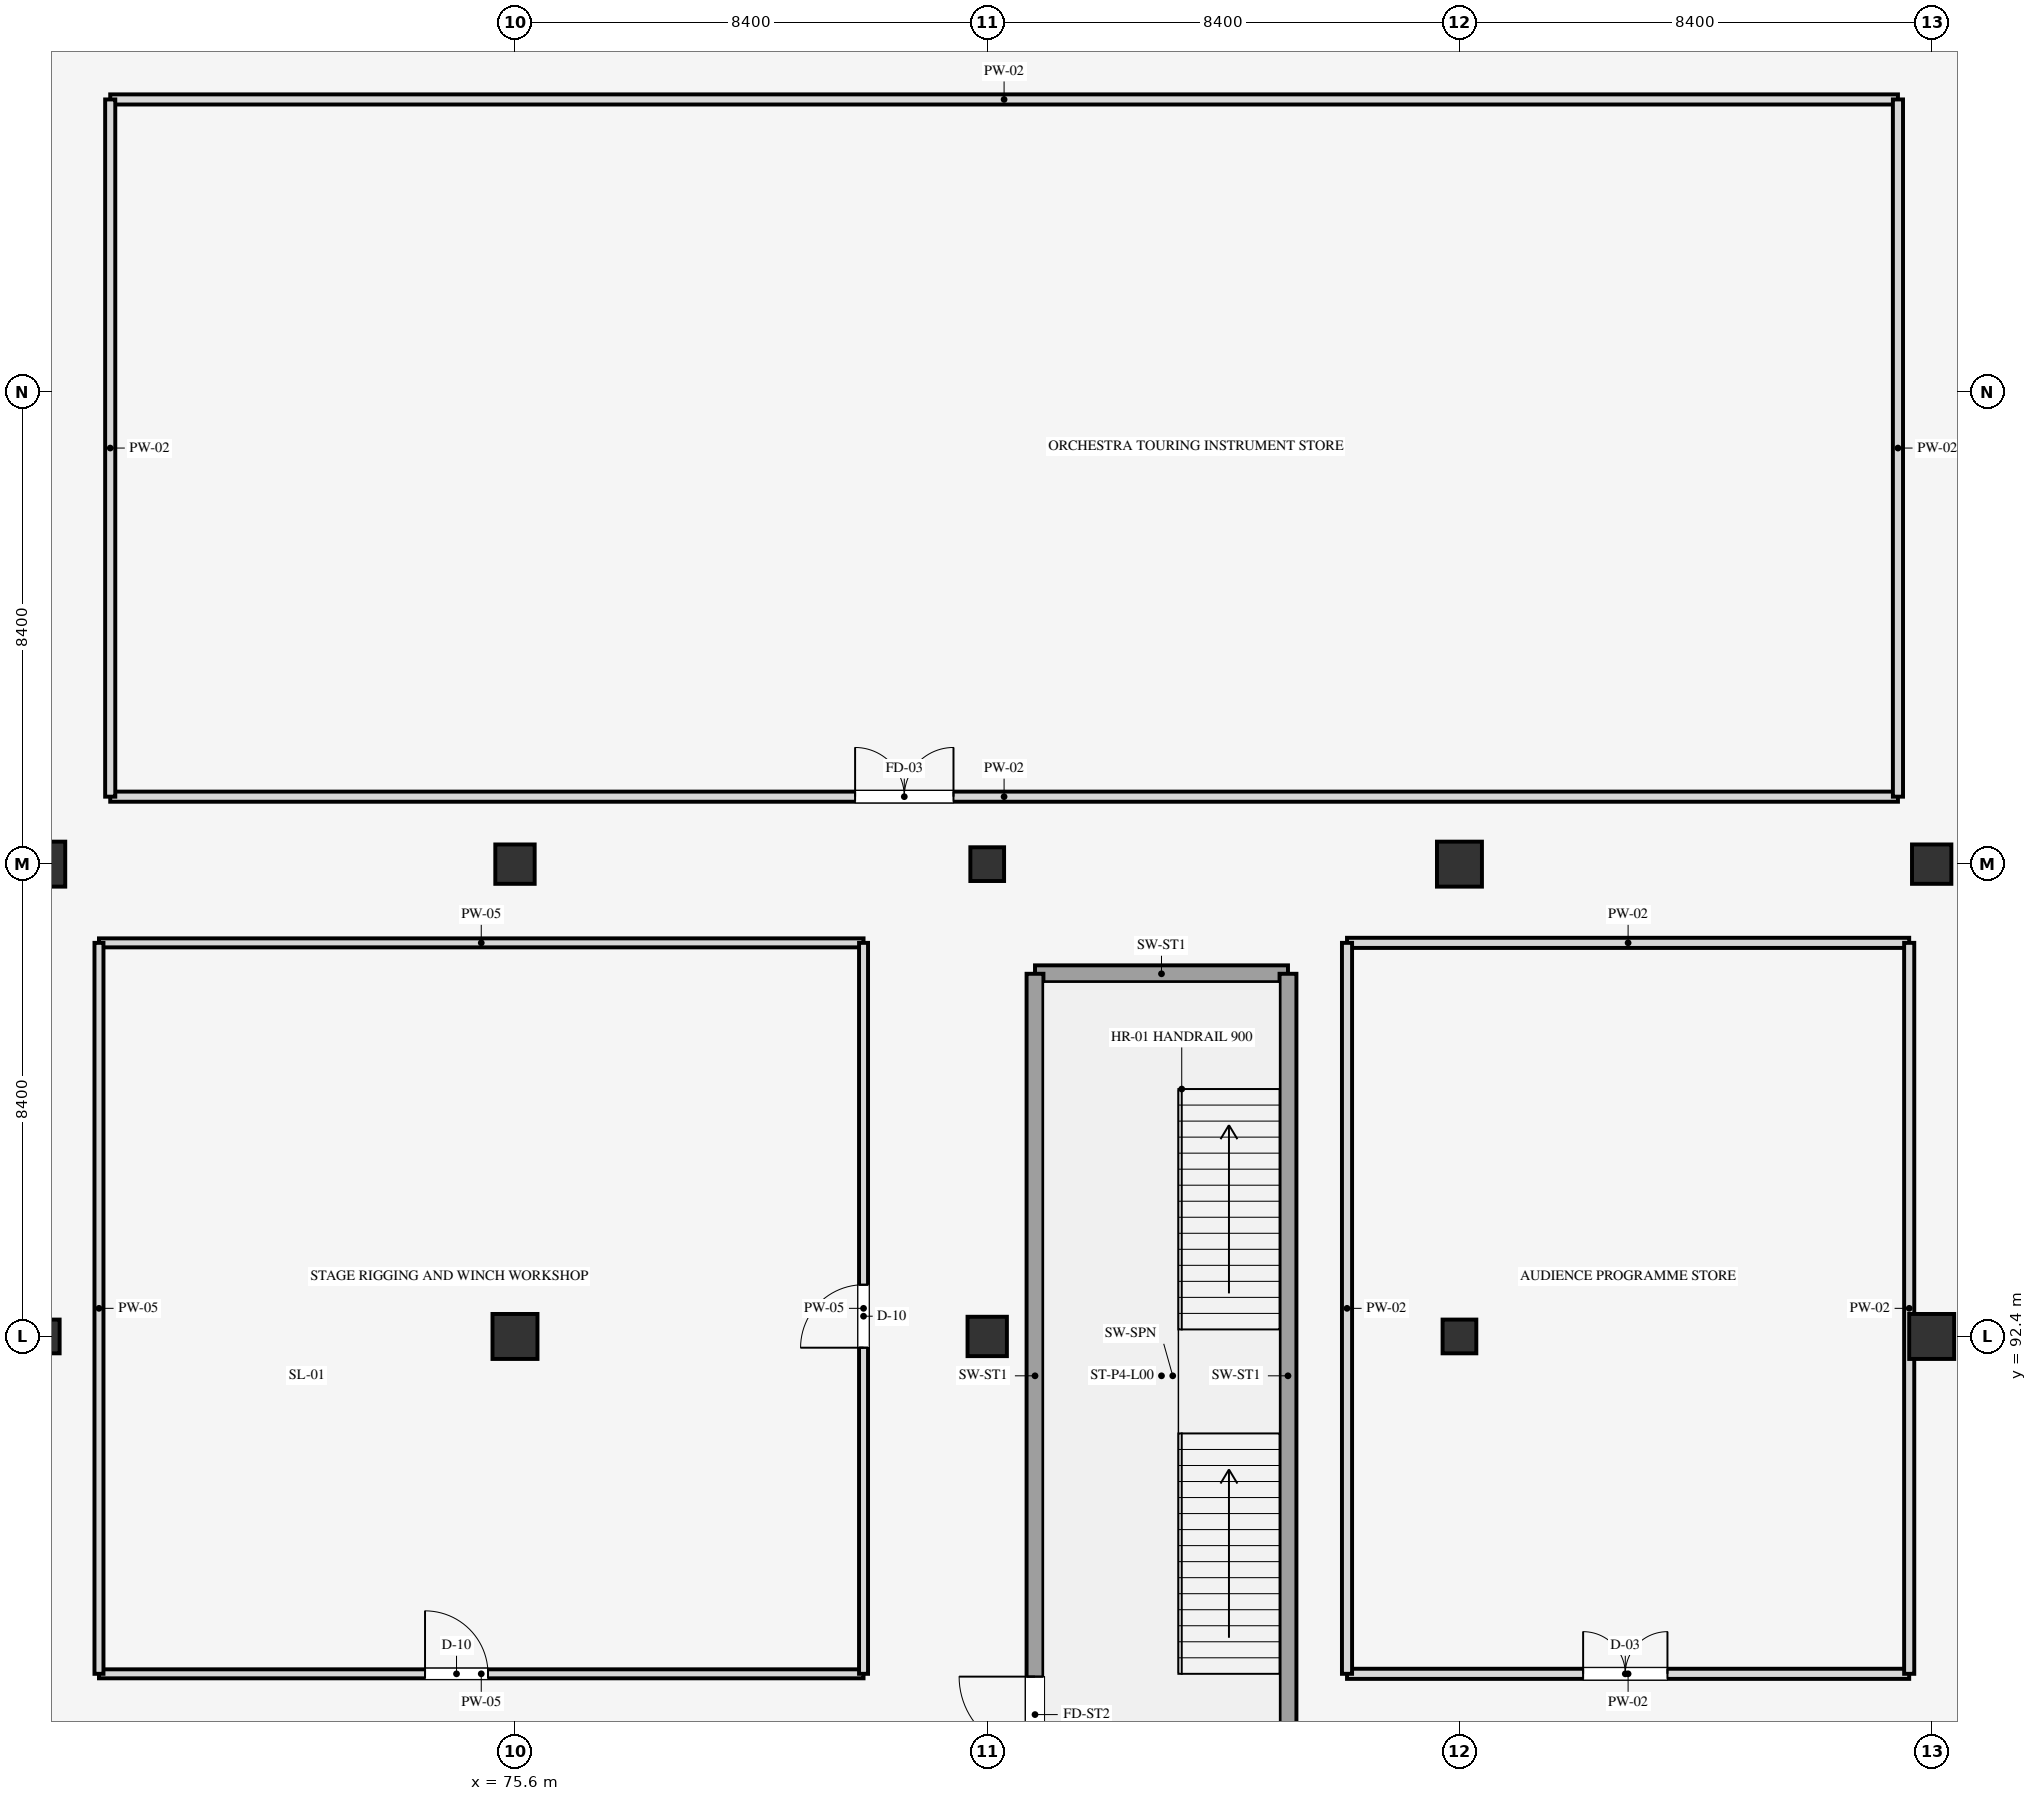
"""IFC4 building model, lengths in metres.
Left out: names, types, materials, properties, quantities, classifications, styles, units other than length and angle.
Written with IfcOpenShell. Run it as: python <this file> out.ifc"""

import sys

from ifc_helpers import new_model, si_unit, direction, frame, frame_2d, origin, origin_2d, place, context, subcontext, project, spatial, rectangle, extrude, element, fill, save


model = new_model("IFC4")
c1 = context("Model", 3, precision=1e-05, world=origin(), true_north=direction((0.0, 1.0)))
c2 = subcontext(c1, "Body", "Model", "MODEL_VIEW")
j1 = project(units=[si_unit("LENGTHUNIT", "METRE"), si_unit("PLANEANGLEUNIT", "RADIAN")], contexts=[c1])
p1 = place(None, origin())
s1 = spatial("IfcSite", under=j1, at=p1, CompositionType="ELEMENT")
p2 = place(p1, origin())
s2 = spatial("IfcBuilding", under=s1, at=p2, CompositionType="ELEMENT")
p3 = place(p2, origin())
s3 = spatial("IfcBuildingStorey", under=s2, at=p3, CompositionType="ELEMENT", Elevation=0.0)
p4 = place(p3, frame((67.2, 92.4, 0.0), z_axis=(0.0, 0.0, 1.0), x_axis=(1.0, 0.0, 0.0)))
e1 = element("IfcColumn", 1, at=p4, inside=s3, PredefinedType="COLUMN", context=c2, shape_type="SweptSolid", body=[
    extrude(rectangle(XDim=0.6, YDim=0.6, at=origin_2d()), origin(), (0.0, 0.0, 1.0), 5.4),
])
for number, where, z_axis, x_axis in (
    (2, (67.2, 100.8, 0.0), (0.0, 0.0, 1.0), (1.0, 0.0, 0.0)),
    (3, (75.6, 92.4, 0.0), (0.0, 0.0, 1.0), (1.0, 0.0, 0.0)),
):
    element("IfcColumn", number, at=place(p3, frame(where, z_axis=z_axis, x_axis=x_axis)), inside=s3, PredefinedType="COLUMN", context=c2, shape_type="SweptSolid", body=[
        extrude(rectangle(XDim=0.8, YDim=0.8, at=origin_2d()), origin(), (0.0, 0.0, 1.0), 5.4),
    ])
for number, where, z_axis, x_axis in (
    (4, (75.6, 100.8, 0.0), (0.0, 0.0, 1.0), (1.0, 0.0, 0.0)),
    (5, (84.0, 92.4, 0.0), (0.0, 0.0, 1.0), (1.0, 0.0, 0.0)),
):
    element("IfcColumn", number, at=place(p3, frame(where, z_axis=z_axis, x_axis=x_axis)), inside=s3, PredefinedType="COLUMN", context=c2, shape_type="SweptSolid", body=[
        extrude(rectangle(XDim=0.7, YDim=0.7, at=origin_2d()), origin(), (0.0, 0.0, 1.0), 5.4),
    ])
for number, where, z_axis, x_axis in (
    (6, (84.0, 100.8, 0.0), (0.0, 0.0, 1.0), (1.0, 0.0, 0.0)),
    (7, (92.4, 92.4, 0.0), (0.0, 0.0, 1.0), (1.0, 0.0, 0.0)),
):
    element("IfcColumn", number, at=place(p3, frame(where, z_axis=z_axis, x_axis=x_axis)), inside=s3, PredefinedType="COLUMN", context=c2, shape_type="SweptSolid", body=[
        extrude(rectangle(XDim=0.6, YDim=0.6, at=origin_2d()), origin(), (0.0, 0.0, 1.0), 5.4),
    ])
for number, where, z_axis, x_axis in (
    (8, (92.4, 100.8, 0.0), (0.0, 0.0, 1.0), (1.0, 0.0, 0.0)),
    (9, (100.8, 92.4, 0.0), (0.0, 0.0, 1.0), (1.0, 0.0, 0.0)),
):
    element("IfcColumn", number, at=place(p3, frame(where, z_axis=z_axis, x_axis=x_axis)), inside=s3, PredefinedType="COLUMN", context=c2, shape_type="SweptSolid", body=[
        extrude(rectangle(XDim=0.8, YDim=0.8, at=origin_2d()), origin(), (0.0, 0.0, 1.0), 5.4),
    ])
p5 = place(p3, frame((100.8, 100.8, 0.0), z_axis=(0.0, 0.0, 1.0), x_axis=(1.0, 0.0, 0.0)))
e10 = element("IfcColumn", 10, at=p5, inside=s3, PredefinedType="COLUMN", context=c2, shape_type="SweptSolid", body=[
    extrude(rectangle(XDim=0.7, YDim=0.7, at=origin_2d()), origin(), (0.0, 0.0, 1.0), 5.4),
])
p6 = place(p3, frame((84.85, 98.85, 0.0), z_axis=(0.0, 0.0, 1.0), x_axis=(1.0, 0.0, 0.0)))
e11 = element("IfcWall", 11, at=p6, inside=s3, PredefinedType="SHEAR", context=c2, shape_type="SweptSolid", body=[
    extrude(rectangle(XDim=4.5, YDim=0.3, at=frame_2d((2.25, 0.0))), origin(), (0.0, 0.0, 1.0), 5.4),
])
p7 = place(p3, frame((84.85, 84.55, 0.0), z_axis=(0.0, 0.0, 1.0), x_axis=(0.0, 1.0, 0.0)))
e12 = element("IfcWall", 12, at=p7, inside=s3, PredefinedType="SHEAR", context=c2, shape_type="SweptSolid", body=[
    extrude(rectangle(XDim=14.3, YDim=0.3, at=frame_2d((7.15, 0.0))), origin(), (0.0, 0.0, 1.0), 5.4),
])
p8 = place(p7, frame((0.45, 0.0, 0.0)))
e13 = element("IfcOpeningElement", 13, at=p8, cuts=e12, PredefinedType="OPENING", context=c2, shape_type="SweptSolid", body=[
    extrude(rectangle(XDim=1.35, YDim=2.15, at=frame_2d((0.675, 1.075))), frame((0.0, 0.16, 0.0), z_axis=(0.0, -1.0, 0.0), x_axis=(1.0, 0.0, 0.0)), (0.0, 0.0, 1.0), 0.32),
])
p9 = place(p3, frame((89.35, 84.55, 0.0), z_axis=(0.0, 0.0, 1.0), x_axis=(0.0, 1.0, 0.0)))
e14 = element("IfcWall", 14, at=p9, inside=s3, PredefinedType="SHEAR", context=c2, shape_type="SweptSolid", body=[
    extrude(rectangle(XDim=14.3, YDim=0.3, at=frame_2d((7.15, 0.0))), origin(), (0.0, 0.0, 1.0), 5.4),
])
p10 = place(p3, frame((87.3, 86.2, 0.0), z_axis=(0.0, 0.0, 1.0), x_axis=(0.0, 1.0, 0.0)))
e15 = element("IfcWall", 15, at=p10, inside=s3, PredefinedType="SHEAR", context=c2, shape_type="SweptSolid", body=[
    extrude(rectangle(XDim=11.0, YDim=0.2, at=frame_2d((5.5, 0.0))), origin(), (0.0, 0.0, 1.0), 5.4),
])
p11 = place(p3, frame((68.2, 86.4, 0.0), z_axis=(0.0, 0.0, 1.0), x_axis=(1.0, 0.0, 0.0)))
e16 = element("IfcWall", 16, at=p11, inside=s3, PredefinedType="PARTITIONING", context=c2, shape_type="SweptSolid", body=[
    extrude(rectangle(XDim=13.6, YDim=0.16, at=frame_2d((6.8, 0.0))), origin(), (0.0, 0.0, 1.0), 4.44),
])
p12 = place(p11, frame((5.8, 0.0, 0.0)))
e17 = element("IfcOpeningElement", 17, at=p12, cuts=e16, PredefinedType="OPENING", context=c2, shape_type="SweptSolid", body=[
    extrude(rectangle(XDim=1.12, YDim=2.14, at=frame_2d((0.56, 1.07))), frame((0.0, 0.09, 0.0), z_axis=(0.0, -1.0, 0.0), x_axis=(1.0, 0.0, 0.0)), (0.0, 0.0, 1.0), 0.18),
])
p13 = place(p3, frame((68.2, 99.4, 0.0), z_axis=(0.0, 0.0, 1.0), x_axis=(1.0, 0.0, 0.0)))
e18 = element("IfcWall", 18, at=p13, inside=s3, PredefinedType="PARTITIONING", context=c2, shape_type="SweptSolid", body=[
    extrude(rectangle(XDim=13.6, YDim=0.16, at=frame_2d((6.8, 0.0))), origin(), (0.0, 0.0, 1.0), 4.44),
])
p14 = place(p3, frame((68.2, 86.4, 0.0), z_axis=(0.0, 0.0, 1.0), x_axis=(0.0, 1.0, 0.0)))
e19 = element("IfcWall", 19, at=p14, inside=s3, PredefinedType="PARTITIONING", context=c2, shape_type="SweptSolid", body=[
    extrude(rectangle(XDim=13.0, YDim=0.16, at=frame_2d((6.5, 0.0))), origin(), (0.0, 0.0, 1.0), 4.44),
])
p15 = place(p3, frame((81.8, 86.4, 0.0), z_axis=(0.0, 0.0, 1.0), x_axis=(0.0, 1.0, 0.0)))
e20 = element("IfcWall", 20, at=p15, inside=s3, PredefinedType="PARTITIONING", context=c2, shape_type="SweptSolid", body=[
    extrude(rectangle(XDim=13.0, YDim=0.16, at=frame_2d((6.5, 0.0))), origin(), (0.0, 0.0, 1.0), 4.44),
])
p16 = place(p15, frame((5.8, 0.0, 0.0)))
e21 = element("IfcOpeningElement", 21, at=p16, cuts=e20, PredefinedType="OPENING", context=c2, shape_type="SweptSolid", body=[
    extrude(rectangle(XDim=1.12, YDim=2.14, at=frame_2d((0.56, 1.07))), frame((0.0, 0.09, 0.0), z_axis=(0.0, -1.0, 0.0), x_axis=(1.0, 0.0, 0.0)), (0.0, 0.0, 1.0), 0.18),
])
p17 = place(p3, frame((90.4, 86.4, 0.0), z_axis=(0.0, 0.0, 1.0), x_axis=(1.0, 0.0, 0.0)))
e22 = element("IfcWall", 22, at=p17, inside=s3, PredefinedType="PARTITIONING", context=c2, shape_type="SweptSolid", body=[
    extrude(rectangle(XDim=10.0, YDim=0.18, at=frame_2d((5.0, 0.0))), origin(), (0.0, 0.0, 1.0), 4.44),
])
p18 = place(p17, frame((4.2, 0.0, 0.0)))
e23 = element("IfcOpeningElement", 23, at=p18, cuts=e22, PredefinedType="OPENING", context=c2, shape_type="SweptSolid", body=[
    extrude(rectangle(XDim=1.5, YDim=2.2, at=frame_2d((0.75, 1.1))), frame((0.0, 0.1, 0.0), z_axis=(0.0, -1.0, 0.0), x_axis=(1.0, 0.0, 0.0)), (0.0, 0.0, 1.0), 0.2),
])
p19 = place(p3, frame((90.4, 99.4, 0.0), z_axis=(0.0, 0.0, 1.0), x_axis=(1.0, 0.0, 0.0)))
e24 = element("IfcWall", 24, at=p19, inside=s3, PredefinedType="PARTITIONING", context=c2, shape_type="SweptSolid", body=[
    extrude(rectangle(XDim=10.0, YDim=0.18, at=frame_2d((5.0, 0.0))), origin(), (0.0, 0.0, 1.0), 4.44),
])
for number, where, z_axis, x_axis in (
    (25, (90.4, 86.4, 0.0), (0.0, 0.0, 1.0), (0.0, 1.0, 0.0)),
    (26, (100.4, 86.4, 0.0), (0.0, 0.0, 1.0), (0.0, 1.0, 0.0)),
):
    element("IfcWall", number, at=place(p3, frame(where, z_axis=z_axis, x_axis=x_axis)), inside=s3, PredefinedType="PARTITIONING", context=c2, shape_type="SweptSolid", body=[
        extrude(rectangle(XDim=13.0, YDim=0.18, at=frame_2d((6.5, 0.0))), origin(), (0.0, 0.0, 1.0), 4.44),
    ])
p20 = place(p3, frame((68.4, 102.0, 0.0), z_axis=(0.0, 0.0, 1.0), x_axis=(1.0, 0.0, 0.0)))
e27 = element("IfcWall", 27, at=p20, inside=s3, PredefinedType="PARTITIONING", context=c2, shape_type="SweptSolid", body=[
    extrude(rectangle(XDim=31.8, YDim=0.18, at=frame_2d((15.9, 0.0))), origin(), (0.0, 0.0, 1.0), 4.44),
])
p21 = place(p20, frame((13.25, 0.0, 0.0)))
e28 = element("IfcOpeningElement", 28, at=p21, cuts=e27, PredefinedType="OPENING", context=c2, shape_type="SweptSolid", body=[
    extrude(rectangle(XDim=1.75, YDim=2.2, at=frame_2d((0.875, 1.1))), frame((0.0, 0.1, 0.0), z_axis=(0.0, -1.0, 0.0), x_axis=(1.0, 0.0, 0.0)), (0.0, 0.0, 1.0), 0.2),
])
p22 = place(p3, frame((68.4, 114.4, 0.0), z_axis=(0.0, 0.0, 1.0), x_axis=(1.0, 0.0, 0.0)))
e29 = element("IfcWall", 29, at=p22, inside=s3, PredefinedType="PARTITIONING", context=c2, shape_type="SweptSolid", body=[
    extrude(rectangle(XDim=31.8, YDim=0.18, at=frame_2d((15.9, 0.0))), origin(), (0.0, 0.0, 1.0), 4.44),
])
for number, where, z_axis, x_axis in (
    (30, (68.4, 102.0, 0.0), (0.0, 0.0, 1.0), (0.0, 1.0, 0.0)),
    (31, (100.2, 102.0, 0.0), (0.0, 0.0, 1.0), (0.0, 1.0, 0.0)),
):
    element("IfcWall", number, at=place(p3, frame(where, z_axis=z_axis, x_axis=x_axis)), inside=s3, PredefinedType="PARTITIONING", context=c2, shape_type="SweptSolid", body=[
        extrude(rectangle(XDim=12.4, YDim=0.18, at=frame_2d((6.2, 0.0))), origin(), (0.0, 0.0, 1.0), 4.44),
    ])
p23 = place(p8, origin())
e32 = element("IfcDoor", 32, at=p23, inside=s3, OperationType="SINGLE_SWING_RIGHT", PredefinedType="DOOR", context=c2, shape_type="SweptSolid", body=[
    extrude(rectangle(XDim=1.35, YDim=2.15, at=frame_2d((0.675, 1.075))), frame((0.0, 0.025, 0.0), z_axis=(0.0, -1.0, 0.0), x_axis=(1.0, 0.0, 0.0)), (0.0, 0.0, 1.0), 0.05),
])
fill(e13, e32)
p24 = place(p12, origin())
e33 = element("IfcDoor", 33, at=p24, inside=s3, OperationType="SINGLE_SWING_LEFT", PredefinedType="DOOR", context=c2, shape_type="SweptSolid", body=[
    extrude(rectangle(XDim=1.12, YDim=2.14, at=frame_2d((0.56, 1.07))), frame((0.0, 0.025, 0.0), z_axis=(0.0, -1.0, 0.0), x_axis=(1.0, 0.0, 0.0)), (0.0, 0.0, 1.0), 0.05),
])
fill(e17, e33)
p25 = place(p16, origin())
e34 = element("IfcDoor", 34, at=p25, inside=s3, OperationType="SINGLE_SWING_LEFT", PredefinedType="DOOR", context=c2, shape_type="SweptSolid", body=[
    extrude(rectangle(XDim=1.12, YDim=2.14, at=frame_2d((0.56, 1.07))), frame((0.0, 0.025, 0.0), z_axis=(0.0, -1.0, 0.0), x_axis=(1.0, 0.0, 0.0)), (0.0, 0.0, 1.0), 0.05),
])
fill(e21, e34)
p26 = place(p18, origin())
e35 = element("IfcDoor", 35, at=p26, inside=s3, OperationType="DOUBLE_DOOR_SINGLE_SWING", PredefinedType="DOOR", context=c2, shape_type="SweptSolid", body=[
    extrude(rectangle(XDim=1.5, YDim=2.2, at=frame_2d((0.75, 1.1))), frame((0.0, 0.025, 0.0), z_axis=(0.0, -1.0, 0.0), x_axis=(1.0, 0.0, 0.0)), (0.0, 0.0, 1.0), 0.05),
])
fill(e23, e35)
p27 = place(p21, origin())
e36 = element("IfcDoor", 36, at=p27, inside=s3, OperationType="DOUBLE_DOOR_SINGLE_SWING", PredefinedType="DOOR", context=c2, shape_type="SweptSolid", body=[
    extrude(rectangle(XDim=1.75, YDim=2.2, at=frame_2d((0.875, 1.1))), frame((0.0, 0.025, 0.0), z_axis=(0.0, -1.0, 0.0), x_axis=(1.0, 0.0, 0.0)), (0.0, 0.0, 1.0), 0.05),
])
fill(e28, e36)
save(model, sys.argv[1])
